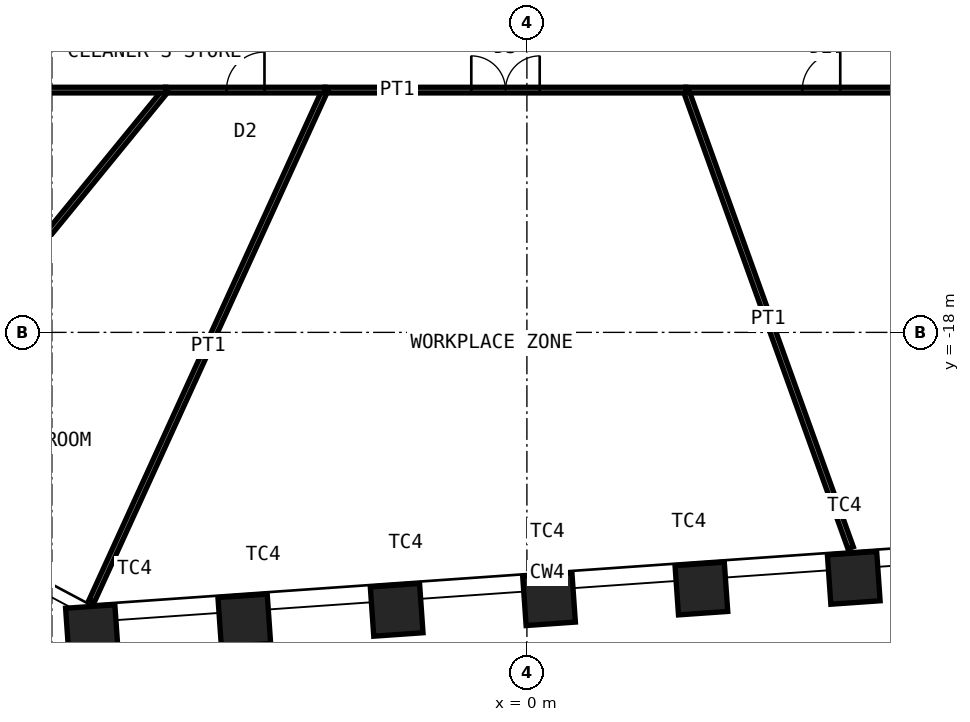
"""IFC4 building model, lengths in metres.
Left out: names, types, materials, properties, quantities, classifications, styles, units other than length and angle.
Written with IfcOpenShell. Run it as: python <this file> out.ifc"""

import sys

from ifc_helpers import new_model, si_unit, direction, frame, frame_2d, origin, origin_2d, place, context, subcontext, project, spatial, rectangle, hollow_rectangle, extrude, element, fill, save


model = new_model("IFC4")
c1 = context("Model", 3, precision=1e-05, world=origin(), true_north=direction((0.0, 1.0)))
c2 = subcontext(c1, "Body", "Model", "MODEL_VIEW")
j1 = project(units=[si_unit("LENGTHUNIT", "METRE"), si_unit("PLANEANGLEUNIT", "RADIAN")], contexts=[c1])
p1 = place(None, origin())
s1 = spatial("IfcSite", under=j1, at=p1, CompositionType="ELEMENT")
p2 = place(p1, origin())
s2 = spatial("IfcBuilding", under=s1, at=p2, CompositionType="ELEMENT")
p3 = place(p2, frame((0.0, 0.0, 153.4)))
s3 = spatial("IfcBuildingStorey", under=s2, at=p3, CompositionType="ELEMENT", Elevation=153.4)
for number, where, z_axis, x_axis in (
    (1, (8.601, -24.46, 0.0), (0.0, 0.0, 1.0), (0.998, 0.07, 0.0)),
    (2, (4.592, -24.74, 0.0), (0.0, 0.0, 1.0), (0.998, 0.07, 0.0)),
    (3, (0.582, -25.02, 0.0), (0.0, 0.0, 1.0), (0.998, 0.07, 0.0)),
    (4, (-3.427, -25.301, 0.0), (0.0, 0.0, 1.0), (0.998, 0.07, 0.0)),
    (5, (-7.436, -25.581, 0.0), (0.0, 0.0, 1.0), (0.998, 0.07, 0.0)),
    (6, (-11.446, -25.861, 0.0), (0.0, 0.0, 1.0), (0.998, 0.07, 0.0)),
):
    element("IfcColumn", number, at=place(p3, frame(where, z_axis=z_axis, x_axis=x_axis)), inside=s3, PredefinedType="COLUMN", context=c2, shape_type="SweptSolid", body=[
        extrude(hollow_rectangle(XDim=1.3, YDim=1.3, WallThickness=0.1, at=origin_2d()), origin(), (0.0, 0.0, 1.0), 4.2),
    ])
p4 = place(p3, frame((11.307, -11.625, 0.0), z_axis=(0.0, 0.0, 1.0), x_axis=(-1.0, 0.0, 0.0)))
e7 = element("IfcWall", 7, at=p4, inside=s3, PredefinedType="PARTITIONING", context=c2, shape_type="SweptSolid", body=[
    extrude(rectangle(XDim=7.123, YDim=0.15, at=frame_2d((3.562, 0.0))), origin(), (0.0, 0.0, 1.0), 4.03),
])
p5 = place(p4, frame((3.062, 0.0, 0.0)))
e8 = element("IfcOpeningElement", 8, at=p5, cuts=e7, PredefinedType="OPENING", context=c2, shape_type="SweptSolid", body=[
    extrude(rectangle(XDim=1.0, YDim=2.4, at=frame_2d((0.5, 1.2))), frame((0.0, 0.085, 0.0), z_axis=(0.0, -1.0, 0.0), x_axis=(1.0, 0.0, 0.0)), (0.0, 0.0, 1.0), 0.17),
])
p6 = place(p3, frame((8.518, -23.667, 0.0), z_axis=(0.0, 0.0, 1.0), x_axis=(-0.338635030469, 0.940917805198, 0.0)))
e9 = element("IfcWall", 9, at=p6, inside=s3, PredefinedType="PARTITIONING", context=c2, shape_type="SweptSolid", body=[
    extrude(rectangle(XDim=12.798, YDim=0.15, at=frame_2d((6.399, 0.0))), origin(), (0.0, 0.0, 1.0), 3.33),
])
p7 = place(p3, frame((4.184, -11.625, 0.0), z_axis=(0.0, 0.0, 1.0), x_axis=(-1.0, 0.0, 0.0)))
e10 = element("IfcWall", 10, at=p7, inside=s3, PredefinedType="PARTITIONING", context=c2, shape_type="SweptSolid", body=[
    extrude(rectangle(XDim=9.494, YDim=0.15, at=frame_2d((4.747, 0.0))), origin(), (0.0, 0.0, 1.0), 4.03),
])
p8 = place(p7, frame((3.847, 0.0, 0.0)))
e11 = element("IfcOpeningElement", 11, at=p8, cuts=e10, PredefinedType="OPENING", context=c2, shape_type="SweptSolid", body=[
    extrude(rectangle(XDim=1.8, YDim=2.4, at=frame_2d((0.9, 1.2))), frame((0.0, 0.085, 0.0), z_axis=(0.0, -1.0, 0.0), x_axis=(1.0, 0.0, 0.0)), (0.0, 0.0, 1.0), 0.17),
])
p9 = place(p3, frame((-11.453, -25.072, 0.0), z_axis=(0.0, 0.0, 1.0), x_axis=(0.415494357555, 0.909595755729, 0.0)))
e12 = element("IfcWall", 12, at=p9, inside=s3, PredefinedType="PARTITIONING", context=c2, shape_type="SweptSolid", body=[
    extrude(rectangle(XDim=14.784, YDim=0.15, at=frame_2d((7.392, 0.0))), origin(), (0.0, 0.0, 1.0), 2.93),
])
p10 = place(p3, frame((-5.31, -11.625, 0.0), z_axis=(0.0, 0.0, 1.0), x_axis=(-1.0, 0.0, 0.0)))
e13 = element("IfcWall", 13, at=p10, inside=s3, PredefinedType="PARTITIONING", context=c2, shape_type="SweptSolid", body=[
    extrude(rectangle(XDim=4.19, YDim=0.15, at=frame_2d((2.095, 0.0))), origin(), (0.0, 0.0, 1.0), 4.03),
])
p11 = place(p10, frame((1.595, 0.0, 0.0)))
e14 = element("IfcOpeningElement", 14, at=p11, cuts=e13, PredefinedType="OPENING", context=c2, shape_type="SweptSolid", body=[
    extrude(rectangle(XDim=1.0, YDim=2.4, at=frame_2d((0.5, 1.2))), frame((0.0, 0.085, 0.0), z_axis=(0.0, -1.0, 0.0), x_axis=(1.0, 0.0, 0.0)), (0.0, 0.0, 1.0), 0.17),
])
p12 = place(p3, frame((-16.38, -20.042, 0.0), z_axis=(0.0, 0.0, 1.0), x_axis=(0.632814540967, 0.774303400962, 0.0)))
e15 = element("IfcWall", 15, at=p12, inside=s3, PredefinedType="PARTITIONING", context=c2, shape_type="SweptSolid", body=[
    extrude(rectangle(XDim=10.871, YDim=0.15, at=frame_2d((5.435, 0.0))), origin(), (0.0, 0.0, 1.0), 3.33),
])
p13 = place(p3, frame((-9.501, -11.625, 0.0), z_axis=(0.0, 0.0, 1.0), x_axis=(-1.0, 0.0, 0.0)))
e16 = element("IfcWall", 16, at=p13, inside=s3, PredefinedType="PARTITIONING", context=c2, shape_type="SweptSolid", body=[
    extrude(rectangle(XDim=8.577, YDim=0.15, at=frame_2d((4.288, 0.0))), origin(), (0.0, 0.0, 1.0), 4.03),
])
p14 = place(p13, frame((3.788, 0.0, 0.0)))
e17 = element("IfcOpeningElement", 17, at=p14, cuts=e16, PredefinedType="OPENING", context=c2, shape_type="SweptSolid", body=[
    extrude(rectangle(XDim=1.0, YDim=2.4, at=frame_2d((0.5, 1.2))), frame((0.0, 0.085, 0.0), z_axis=(0.0, -1.0, 0.0), x_axis=(1.0, 0.0, 0.0)), (0.0, 0.0, 1.0), 0.17),
])
p15 = place(p5, origin())
e18 = element("IfcDoor", 18, at=p15, inside=s3, OperationType="SINGLE_SWING_LEFT", PredefinedType="DOOR", context=c2, shape_type="SweptSolid", body=[
    extrude(rectangle(XDim=1.0, YDim=2.4, at=frame_2d((0.5, 1.2))), frame((0.0, 0.025, 0.0), z_axis=(0.0, -1.0, 0.0), x_axis=(1.0, 0.0, 0.0)), (0.0, 0.0, 1.0), 0.05),
])
fill(e8, e18)
p16 = place(p8, origin())
e19 = element("IfcDoor", 19, at=p16, inside=s3, OperationType="DOUBLE_DOOR_DOUBLE_SWING", PredefinedType="DOOR", context=c2, shape_type="SweptSolid", body=[
    extrude(rectangle(XDim=1.8, YDim=2.4, at=frame_2d((0.9, 1.2))), frame((0.0, 0.025, 0.0), z_axis=(0.0, -1.0, 0.0), x_axis=(1.0, 0.0, 0.0)), (0.0, 0.0, 1.0), 0.05),
])
fill(e11, e19)
p17 = place(p11, origin())
e20 = element("IfcDoor", 20, at=p17, inside=s3, OperationType="SINGLE_SWING_LEFT", PredefinedType="DOOR", context=c2, shape_type="SweptSolid", body=[
    extrude(rectangle(XDim=1.0, YDim=2.4, at=frame_2d((0.5, 1.2))), frame((0.0, 0.025, 0.0), z_axis=(0.0, -1.0, 0.0), x_axis=(1.0, 0.0, 0.0)), (0.0, 0.0, 1.0), 0.05),
])
fill(e14, e20)
save(model, sys.argv[1])
